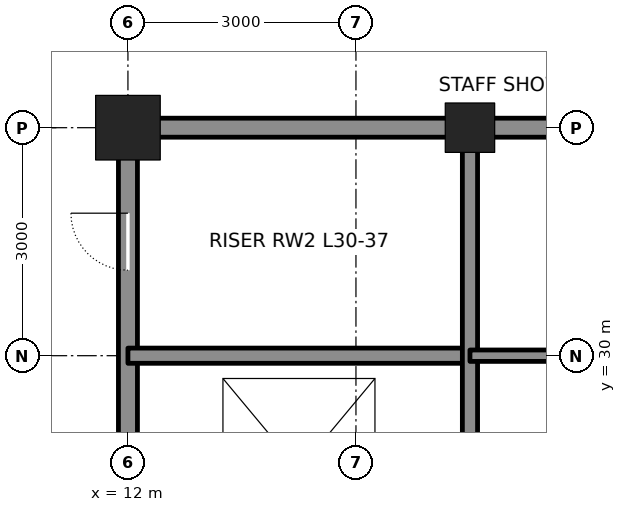
"""IFC4 building model, lengths in metres.
Left out: names, types, materials, properties, quantities, classifications, styles, units other than length and angle.
Written with IfcOpenShell. Run it as: python <this file> out.ifc"""

import sys

from ifc_helpers import new_model, si_unit, direction, frame, frame_2d, origin, origin_2d, place, context, subcontext, project, spatial, rectangle, hollow_rectangle, extrude, element, fill, save


model = new_model("IFC4")
c1 = context("Model", 3, precision=1e-05, world=origin(), true_north=direction((0.0, 1.0)))
c2 = subcontext(c1, "Body", "Model", "MODEL_VIEW")
j1 = project(units=[si_unit("LENGTHUNIT", "METRE"), si_unit("PLANEANGLEUNIT", "RADIAN")], contexts=[c1])
p1 = place(None, origin())
s1 = spatial("IfcSite", under=j1, at=p1, CompositionType="ELEMENT")
p2 = place(p1, origin())
s2 = spatial("IfcBuilding", under=s1, at=p2, CompositionType="ELEMENT")
p3 = place(p2, frame((0.0, 0.0, 140.4)))
s3 = spatial("IfcBuildingStorey", under=s2, at=p3, CompositionType="ELEMENT", Elevation=140.4)
p4 = place(p3, frame((12.0, 33.0, 0.0), z_axis=(0.0, 0.0, 1.0), x_axis=(1.0, 0.0, 0.0)))
e1 = element("IfcColumn", 1, at=p4, inside=s3, PredefinedType="COLUMN", context=c2, shape_type="SweptSolid", body=[
    extrude(hollow_rectangle(XDim=0.85, YDim=0.85, WallThickness=0.085, at=origin_2d()), origin(), (0.0, 0.0, 1.0), 4.2),
])
p5 = place(p3, frame((16.5, 33.0, 0.0), z_axis=(0.0, 0.0, 1.0), x_axis=(1.0, 0.0, 0.0)))
e2 = element("IfcColumn", 2, at=p5, inside=s3, PredefinedType="COLUMN", context=c2, shape_type="SweptSolid", body=[
    extrude(hollow_rectangle(XDim=0.65, YDim=0.65, WallThickness=0.065, at=origin_2d()), origin(), (0.0, 0.0, 1.0), 4.2),
])
p6 = place(p3, frame((12.0, 24.25, 0.0), z_axis=(0.0, 0.0, 1.0), x_axis=(0.0, 1.0, 0.0)))
e3 = element("IfcWall", 3, at=p6, inside=s3, PredefinedType="SOLIDWALL", context=c2, shape_type="SweptSolid", body=[
    extrude(rectangle(XDim=8.5, YDim=0.25, at=frame_2d((4.25, 0.0))), origin(), (0.0, 0.0, 1.0), 3.113),
])
p7 = place(p6, frame((0.65, 0.0, 0.0)))
e4 = element("IfcOpeningElement", 4, at=p7, cuts=e3, PredefinedType="OPENING", context=c2, shape_type="SweptSolid", body=[
    extrude(rectangle(XDim=1.2, YDim=2.1, at=frame_2d((0.6, 1.05))), frame((0.0, 0.135, 0.0), z_axis=(0.0, -1.0, 0.0), x_axis=(1.0, 0.0, 0.0)), (0.0, 0.0, 1.0), 0.27),
])
p8 = place(p6, frame((6.875, 0.0, 0.0)))
e5 = element("IfcOpeningElement", 5, at=p8, cuts=e3, PredefinedType="OPENING", context=c2, shape_type="SweptSolid", body=[
    extrude(rectangle(XDim=0.75, YDim=2.1, at=frame_2d((0.375, 1.05))), frame((0.0, 0.135, 0.0), z_axis=(0.0, -1.0, 0.0), x_axis=(1.0, 0.0, 0.0)), (0.0, 0.0, 1.0), 0.27),
])
p9 = place(p3, frame((12.0, 30.0, 0.0), z_axis=(0.0, 0.0, 1.0), x_axis=(1.0, 0.0, 0.0)))
e6 = element("IfcWall", 6, at=p9, inside=s3, PredefinedType="SOLIDWALL", context=c2, shape_type="SweptSolid", body=[
    extrude(rectangle(XDim=4.5, YDim=0.2, at=frame_2d((2.25, 0.0))), origin(), (0.0, 0.0, 1.0), 4.04),
])
p10 = place(p3, frame((12.25, 33.0, 0.0), z_axis=(0.0, 0.0, 1.0), x_axis=(1.0, 0.0, 0.0)))
e7 = element("IfcWall", 7, at=p10, inside=s3, PredefinedType="SOLIDWALL", context=c2, shape_type="SweptSolid", body=[
    extrude(rectangle(XDim=4.0, YDim=0.25, at=frame_2d((2.0, 0.0))), origin(), (0.0, 0.0, 1.0), 3.182),
])
p11 = place(p3, frame((16.75, 33.0, 0.0), z_axis=(0.0, 0.0, 1.0), x_axis=(1.0, 0.0, 0.0)))
e8 = element("IfcWall", 8, at=p11, inside=s3, PredefinedType="SOLIDWALL", context=c2, shape_type="SweptSolid", body=[
    extrude(rectangle(XDim=2.5, YDim=0.25, at=frame_2d((1.25, 0.0))), origin(), (0.0, 0.0, 1.0), 3.182),
])
p12 = place(p3, frame((16.5, 24.25, 0.0), z_axis=(0.0, 0.0, 1.0), x_axis=(0.0, 1.0, 0.0)))
e9 = element("IfcWall", 9, at=p12, inside=s3, PredefinedType="SOLIDWALL", context=c2, shape_type="SweptSolid", body=[
    extrude(rectangle(XDim=8.5, YDim=0.2, at=frame_2d((4.25, 0.0))), origin(), (0.0, 0.0, 1.0), 3.113),
])
p13 = place(p3, frame((16.5, 30.0, 0.0), z_axis=(0.0, 0.0, 1.0), x_axis=(1.0, 0.0, 0.0)))
e10 = element("IfcWall", 10, at=p13, inside=s3, PredefinedType="PARTITIONING", context=c2, shape_type="SweptSolid", body=[
    extrude(rectangle(XDim=3.0, YDim=0.15, at=frame_2d((1.5, 0.0))), origin(), (0.0, 0.0, 1.0), 4.04),
])
p14 = place(p8, origin())
e11 = element("IfcDoor", 11, at=p14, inside=s3, OperationType="SINGLE_SWING_RIGHT", PredefinedType="DOOR", context=c2, shape_type="SweptSolid", body=[
    extrude(rectangle(XDim=0.75, YDim=2.1, at=frame_2d((0.375, 1.05))), frame((0.0, 0.025, 0.0), z_axis=(0.0, -1.0, 0.0), x_axis=(1.0, 0.0, 0.0)), (0.0, 0.0, 1.0), 0.05),
])
fill(e5, e11)
save(model, sys.argv[1])
